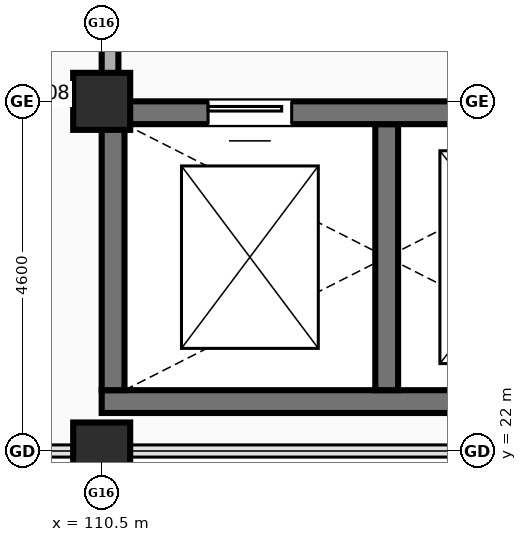
"""IFC4 building model, lengths in metres.
Left out: names, types, materials, properties, quantities, classifications, styles, units other than length and angle.
Written with IfcOpenShell. Run it as: python <this file> out.ifc"""

import sys

from ifc_helpers import new_model, si_unit, direction, frame, frame_2d, origin, origin_2d, place, context, subcontext, project, spatial, rectangle, extrude, element, fill, save


model = new_model("IFC4")
c1 = context("Model", 3, precision=1e-05, world=origin(), true_north=direction((0.0, 1.0)))
c2 = subcontext(c1, "Body", "Model", "MODEL_VIEW")
j1 = project(units=[si_unit("LENGTHUNIT", "METRE"), si_unit("PLANEANGLEUNIT", "RADIAN")], contexts=[c1])
p1 = place(None, origin())
s1 = spatial("IfcSite", under=j1, at=p1, CompositionType="ELEMENT")
p2 = place(p1, origin())
s2 = spatial("IfcBuilding", under=s1, at=p2, CompositionType="ELEMENT")
p3 = place(p2, frame((0.0, 0.0, 5.4)))
s3 = spatial("IfcBuildingStorey", under=s2, at=p3, CompositionType="ELEMENT", Elevation=5.4)
for number, where, z_axis, x_axis in (
    (1, (110.5, 22.0, 0.0), (0.0, 0.0, 1.0), (1.0, 0.0, 0.0)),
    (2, (110.5, 26.6, 0.0), (0.0, 0.0, 1.0), (1.0, 0.0, 0.0)),
):
    element("IfcColumn", number, at=place(p3, frame(where, z_axis=z_axis, x_axis=x_axis)), inside=s3, PredefinedType="COLUMN", context=c2, shape_type="SweptSolid", body=[
        extrude(rectangle(XDim=0.75, YDim=0.75, at=origin_2d()), origin(), (0.0, 0.0, 1.0), 4.4),
    ])
p4 = place(p3, frame((110.5, 22.65, 0.0), z_axis=(0.0, 0.0, 1.0), x_axis=(1.0, 0.0, 0.0)))
e3 = element("IfcWall", 3, at=p4, inside=s3, PredefinedType="SHEAR", context=c2, shape_type="SweptSolid", body=[
    extrude(rectangle(XDim=7.5, YDim=0.3, at=frame_2d((3.75, 0.0))), origin(), (0.0, 0.0, 1.0), 4.4),
])
for number, where, z_axis, x_axis in (
    (4, (110.65, 22.8, 0.0), (0.0, 0.0, 1.0), (0.0, 1.0, 0.0)),
    (5, (114.25, 22.8, 0.0), (0.0, 0.0, 1.0), (0.0, 1.0, 0.0)),
):
    element("IfcWall", number, at=place(p3, frame(where, z_axis=z_axis, x_axis=x_axis)), inside=s3, PredefinedType="SHEAR", context=c2, shape_type="SweptSolid", body=[
        extrude(rectangle(XDim=3.5, YDim=0.3, at=frame_2d((1.75, 0.0))), origin(), (0.0, 0.0, 1.0), 4.4),
    ])
p5 = place(p3, frame((110.5, 26.45, 0.0), z_axis=(0.0, 0.0, 1.0), x_axis=(1.0, 0.0, 0.0)))
e6 = element("IfcWall", 6, at=p5, inside=s3, PredefinedType="SHEAR", context=c2, shape_type="SweptSolid", body=[
    extrude(rectangle(XDim=7.5, YDim=0.3, at=frame_2d((3.75, 0.0))), origin(), (0.0, 0.0, 1.0), 4.4),
])
p6 = place(p5, frame((1.4, 0.0, 0.0)))
e7 = element("IfcOpeningElement", 7, at=p6, cuts=e6, PredefinedType="OPENING", context=c2, shape_type="SweptSolid", body=[
    extrude(rectangle(XDim=1.1, YDim=2.15, at=frame_2d((0.55, 1.075))), frame((0.0, 0.16, 0.0), z_axis=(0.0, -1.0, 0.0), x_axis=(1.0, 0.0, 0.0)), (0.0, 0.0, 1.0), 0.32),
])
p7 = place(p5, frame((5.0, 0.0, 0.0)))
e8 = element("IfcOpeningElement", 8, at=p7, cuts=e6, PredefinedType="OPENING", context=c2, shape_type="SweptSolid", body=[
    extrude(rectangle(XDim=1.6, YDim=2.25, at=frame_2d((0.8, 1.125))), frame((0.0, 0.16, 0.0), z_axis=(0.0, -1.0, 0.0), x_axis=(1.0, 0.0, 0.0)), (0.0, 0.0, 1.0), 0.32),
])
p8 = place(p3, frame((110.61, 26.75, 0.0), z_axis=(0.0, 0.0, 1.0), x_axis=(0.0, 1.0, 0.0)))
e9 = element("IfcWall", 9, at=p8, inside=s3, PredefinedType="SOLIDWALL", context=c2, shape_type="SweptSolid", body=[
    extrude(rectangle(XDim=3.83, YDim=0.22, at=frame_2d((1.915, 0.0))), origin(), (0.0, 0.0, 1.0), 3.3),
])
p9 = place(p6, origin())
e10 = element("IfcDoor", 10, at=p9, inside=s3, OperationType="SLIDING_TO_LEFT", PredefinedType="DOOR", context=c2, shape_type="SweptSolid", body=[
    extrude(rectangle(XDim=1.1, YDim=2.15, at=frame_2d((0.55, 1.075))), frame((0.0, 0.025, 0.0), z_axis=(0.0, -1.0, 0.0), x_axis=(1.0, 0.0, 0.0)), (0.0, 0.0, 1.0), 0.05),
])
fill(e7, e10)
save(model, sys.argv[1])
